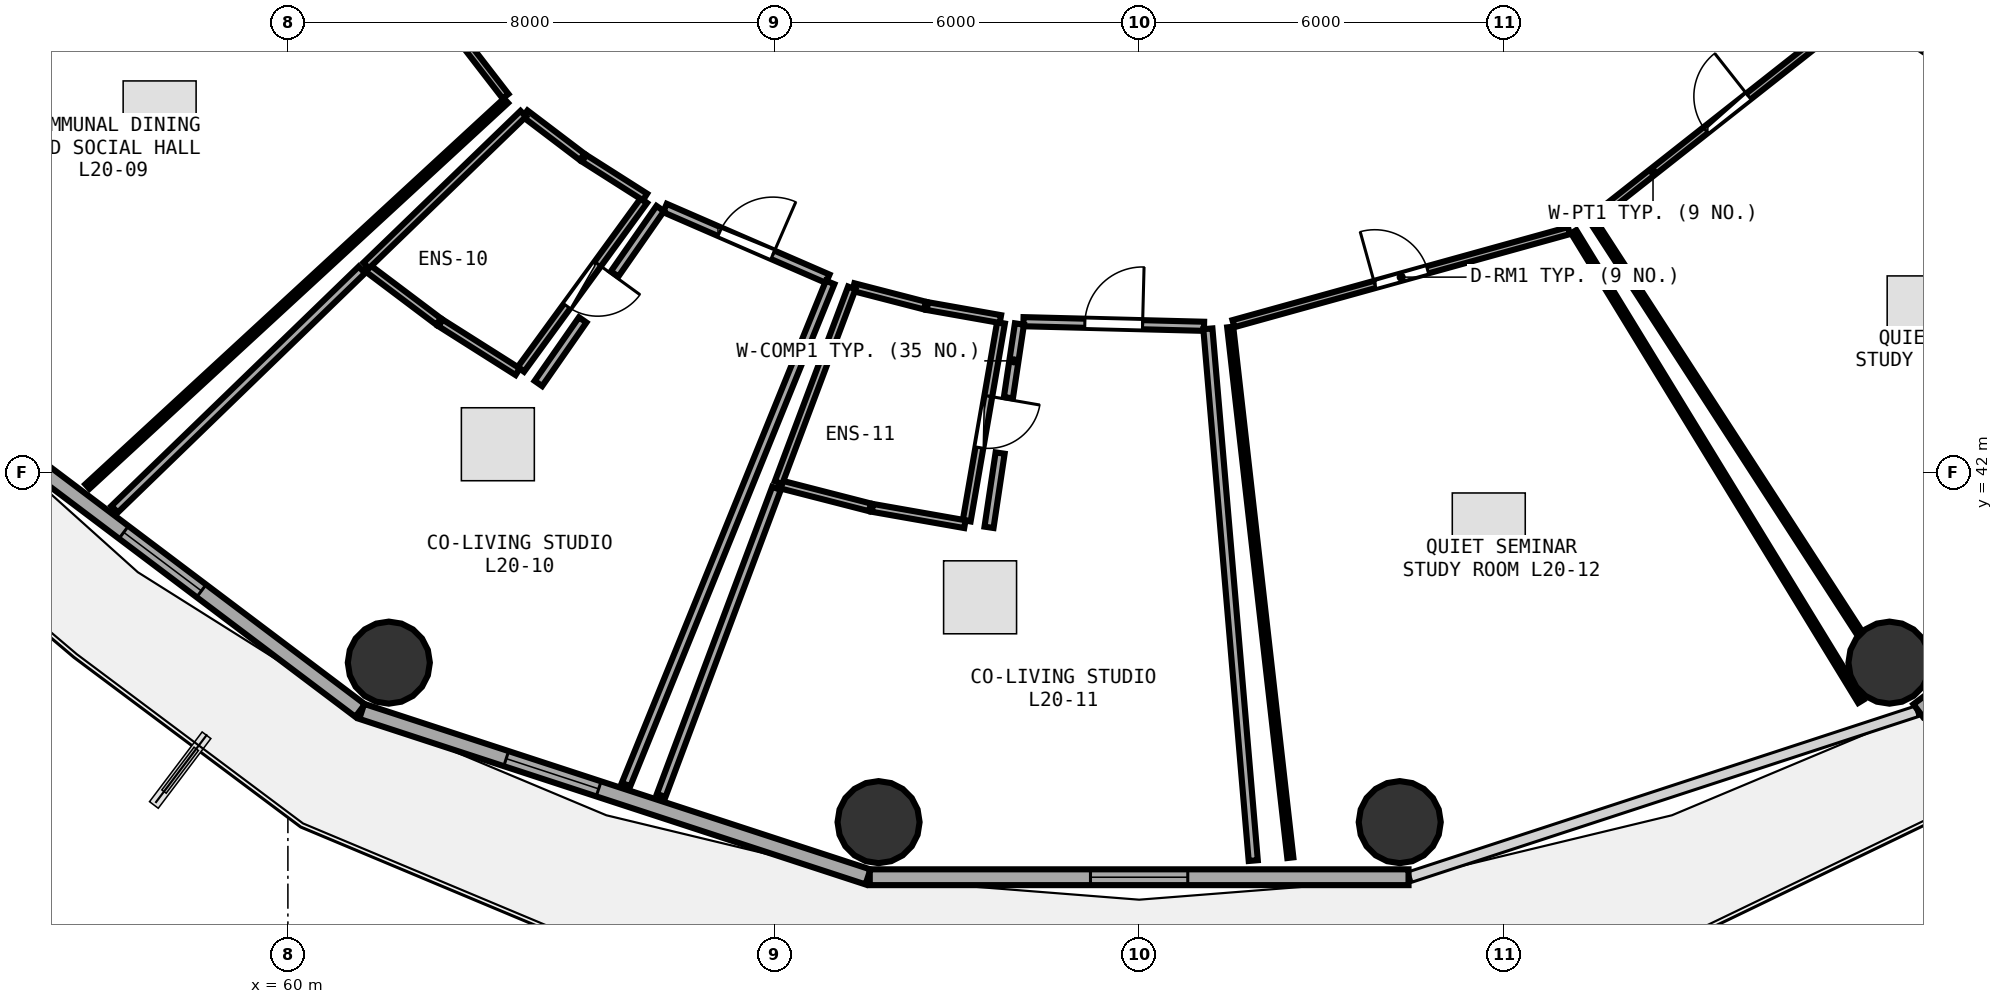
"""IFC4 building model, lengths in metres.
Left out: names, types, materials, properties, quantities, classifications, styles, units other than length and angle.
Written with IfcOpenShell. Run it as: python <this file> out.ifc"""

import sys

from ifc_helpers import new_model, si_unit, direction, frame, frame_2d, origin, origin_2d, place, context, subcontext, project, spatial, rectangle, circle, extrude, element, fill, save


model = new_model("IFC4")
c1 = context("Model", 3, precision=1e-05, world=origin(), true_north=direction((0.0, 1.0)))
c2 = subcontext(c1, "Body", "Model", "MODEL_VIEW")
j1 = project(units=[si_unit("LENGTHUNIT", "METRE"), si_unit("PLANEANGLEUNIT", "RADIAN")], contexts=[c1])
p1 = place(None, origin())
s1 = spatial("IfcSite", under=j1, at=p1, CompositionType="ELEMENT")
p2 = place(p1, origin())
s2 = spatial("IfcBuilding", under=s1, at=p2, CompositionType="ELEMENT")
p3 = place(p2, frame((0.0, 0.0, 80.1)))
s3 = spatial("IfcBuildingStorey", under=s2, at=p3, CompositionType="ELEMENT", Elevation=80.1)
for number, where, z_axis, x_axis in (
    (1, (61.66, 38.878, 0.0), (0.0, 0.0, 1.0), (1.0, 0.0, 0.0)),
    (2, (69.714, 36.255, 0.0), (0.0, 0.0, 1.0), (1.0, 0.0, 0.0)),
    (3, (78.286, 36.255, 0.0), (0.0, 0.0, 1.0), (1.0, 0.0, 0.0)),
    (4, (86.34, 38.878, 0.0), (0.0, 0.0, 1.0), (1.0, 0.0, 0.0)),
):
    element("IfcColumn", number, at=place(p3, frame(where, z_axis=z_axis, x_axis=x_axis)), inside=s3, PredefinedType="COLUMN", context=c2, shape_type="SweptSolid", body=[
        extrude(circle(Radius=0.675, at=origin_2d()), origin(), (0.0, 0.0, 1.0), 3.75),
    ])
p4 = place(p3, frame((54.401, 43.207, 0.0), z_axis=(0.0, 0.0, 1.0), x_axis=(0.798501507879, -0.601992808857, 0.0)))
e5 = element("IfcWall", 5, at=p4, inside=s3, PredefinedType="SOLIDWALL", context=c2, shape_type="SweptSolid", body=[
    extrude(rectangle(XDim=8.499, YDim=0.26, at=frame_2d((4.25, 0.0))), origin(), (0.0, 0.0, 1.0), 3.475),
])
p5 = place(p4, frame((3.63, 0.0, 0.85)))
e6 = element("IfcOpeningElement", 6, at=p5, cuts=e5, PredefinedType="OPENING", context=c2, shape_type="SweptSolid", body=[
    extrude(rectangle(XDim=1.6, YDim=1.45, at=frame_2d((0.8, 0.725))), frame((0.0, 0.14, 0.0), z_axis=(0.0, -1.0, 0.0), x_axis=(1.0, 0.0, 0.0)), (0.0, 0.0, 1.0), 0.28),
])
p6 = place(p3, frame((61.214, 38.077, 0.0), z_axis=(0.0, 0.0, 1.0), x_axis=(0.950471101963, -0.310812941064, 0.0)))
e7 = element("IfcWall", 7, at=p6, inside=s3, PredefinedType="SOLIDWALL", context=c2, shape_type="SweptSolid", body=[
    extrude(rectangle(XDim=8.76, YDim=0.26, at=frame_2d((4.38, 0.0))), origin(), (0.0, 0.0, 1.0), 3.475),
])
p7 = place(p6, frame((2.5, 0.0, 0.85)))
e8 = element("IfcOpeningElement", 8, at=p7, cuts=e7, PredefinedType="OPENING", context=c2, shape_type="SweptSolid", body=[
    extrude(rectangle(XDim=1.6, YDim=1.45, at=frame_2d((0.8, 0.725))), frame((0.0, 0.14, 0.0), z_axis=(0.0, -1.0, 0.0), x_axis=(1.0, 0.0, 0.0)), (0.0, 0.0, 1.0), 0.28),
])
p8 = place(p3, frame((69.57, 35.349, 0.0), z_axis=(0.0, 0.0, 1.0), x_axis=(1.0, 0.0, 0.0)))
e9 = element("IfcWall", 9, at=p8, inside=s3, PredefinedType="SOLIDWALL", context=c2, shape_type="SweptSolid", body=[
    extrude(rectangle(XDim=8.861, YDim=0.26, at=frame_2d((4.43, 0.0))), origin(), (0.0, 0.0, 1.0), 3.475),
])
p9 = place(p8, frame((3.63, 0.0, 0.85)))
e10 = element("IfcOpeningElement", 10, at=p9, cuts=e9, PredefinedType="OPENING", context=c2, shape_type="SweptSolid", body=[
    extrude(rectangle(XDim=1.6, YDim=1.45, at=frame_2d((0.8, 0.725))), frame((0.0, 0.14, 0.0), z_axis=(0.0, -1.0, 0.0), x_axis=(1.0, 0.0, 0.0)), (0.0, 0.0, 1.0), 0.28),
])
p10 = place(p3, frame((86.812, 38.09, 0.0), z_axis=(0.0, 0.0, 1.0), x_axis=(0.798501507879, 0.601992808857, 0.0)))
e11 = element("IfcWall", 11, at=p10, inside=s3, PredefinedType="SOLIDWALL", context=c2, shape_type="SweptSolid", body=[
    extrude(rectangle(XDim=8.499, YDim=0.26, at=frame_2d((4.25, 0.0))), origin(), (0.0, 0.0, 1.0), 3.475),
])
p11 = place(p10, frame((3.45, 0.0, 0.85)))
e12 = element("IfcOpeningElement", 12, at=p11, cuts=e11, PredefinedType="OPENING", context=c2, shape_type="SweptSolid", body=[
    extrude(rectangle(XDim=1.6, YDim=1.45, at=frame_2d((0.8, 0.725))), frame((0.0, 0.14, 0.0), z_axis=(0.0, -1.0, 0.0), x_axis=(1.0, 0.0, 0.0)), (0.0, 0.0, 1.0), 0.28),
])
p12 = place(p3, frame((60.275, 52.473, 0.0), z_axis=(0.0, 0.0, 1.0), x_axis=(0.611167326409, -0.791501420801, 0.0)))
e13 = element("IfcWall", 13, at=p12, inside=s3, PredefinedType="PARTITIONING", context=c2, shape_type="SweptSolid", body=[
    extrude(rectangle(XDim=5.407, YDim=0.12, at=frame_2d((2.704, 0.0))), origin(), (0.0, 0.0, 1.0), 2.925),
])
p13 = place(p12, frame((2.254, 0.0, 0.0)))
e14 = element("IfcOpeningElement", 14, at=p13, cuts=e13, PredefinedType="OPENING", context=c2, shape_type="SweptSolid", body=[
    extrude(rectangle(XDim=0.9, YDim=2.08, at=frame_2d((0.45, 1.04))), frame((0.0, 0.07, 0.0), z_axis=(0.0, -1.0, 0.0), x_axis=(1.0, 0.0, 0.0)), (0.0, 0.0, 1.0), 0.14),
])
p14 = place(p3, frame((65.855, 46.477, 0.0), z_axis=(0.0, 0.0, 1.0), x_axis=(-0.589016516568, -0.808120995402, 0.0)))
e15 = element("IfcWall", 15, at=p14, inside=s3, PredefinedType="PLUMBINGWALL", context=c2, shape_type="SweptSolid", body=[
    extrude(rectangle(XDim=3.435, YDim=0.13, at=frame_2d((1.718, 0.0))), origin(), (0.0, 0.0, 1.0), 3.175),
])
p15 = place(p14, frame((1.288, 0.0, 0.0)))
e16 = element("IfcOpeningElement", 16, at=p15, cuts=e15, PredefinedType="OPENING", context=c2, shape_type="SweptSolid", body=[
    extrude(rectangle(XDim=0.86, YDim=2.05, at=frame_2d((0.43, 1.025))), frame((0.0, 0.075, 0.0), z_axis=(0.0, -1.0, 0.0), x_axis=(1.0, 0.0, 0.0)), (0.0, 0.0, 1.0), 0.15),
])
p16 = place(p3, frame((66.201, 46.355, 0.0), z_axis=(0.0, 0.0, 1.0), x_axis=(0.917173751057, -0.398487528503, 0.0)))
e17 = element("IfcWall", 17, at=p16, inside=s3, PredefinedType="PARTITIONING", context=c2, shape_type="SweptSolid", body=[
    extrude(rectangle(XDim=2.919, YDim=0.15, at=frame_2d((1.459, 0.0))), origin(), (0.0, 0.0, 1.0), 2.925),
])
p17 = place(p16, frame((0.984, 0.0, 0.0)))
e18 = element("IfcOpeningElement", 18, at=p17, cuts=e17, PredefinedType="OPENING", context=c2, shape_type="SweptSolid", body=[
    extrude(rectangle(XDim=0.95, YDim=2.08, at=frame_2d((0.475, 1.04))), frame((0.0, 0.085, 0.0), z_axis=(0.0, -1.0, 0.0), x_axis=(1.0, 0.0, 0.0)), (0.0, 0.0, 1.0), 0.17),
])
p18 = place(p3, frame((71.728, 44.466, 0.0), z_axis=(0.0, 0.0, 1.0), x_axis=(-0.170592496202, -0.985341666753, 0.0)))
e19 = element("IfcWall", 19, at=p18, inside=s3, PredefinedType="PLUMBINGWALL", context=c2, shape_type="SweptSolid", body=[
    extrude(rectangle(XDim=3.303, YDim=0.13, at=frame_2d((1.651, 0.0))), origin(), (0.0, 0.0, 1.0), 3.175),
])
p19 = place(p18, frame((1.222, 0.0, 0.0)))
e20 = element("IfcOpeningElement", 20, at=p19, cuts=e19, PredefinedType="OPENING", context=c2, shape_type="SweptSolid", body=[
    extrude(rectangle(XDim=0.86, YDim=2.05, at=frame_2d((0.43, 1.025))), frame((0.0, 0.075, 0.0), z_axis=(0.0, -1.0, 0.0), x_axis=(1.0, 0.0, 0.0)), (0.0, 0.0, 1.0), 0.15),
])
p20 = place(p3, frame((72.097, 44.486, 0.0), z_axis=(0.0, 0.0, 1.0), x_axis=(0.999671268913, -0.025638917871, 0.0)))
e21 = element("IfcWall", 21, at=p20, inside=s3, PredefinedType="PARTITIONING", context=c2, shape_type="SweptSolid", body=[
    extrude(rectangle(XDim=2.971, YDim=0.15, at=frame_2d((1.485, 0.0))), origin(), (0.0, 0.0, 1.0), 3.48),
])
p21 = place(p20, frame((1.01, 0.0, 0.0)))
e22 = element("IfcOpeningElement", 22, at=p21, cuts=e21, PredefinedType="OPENING", context=c2, shape_type="SweptSolid", body=[
    extrude(rectangle(XDim=0.95, YDim=2.08, at=frame_2d((0.475, 1.04))), frame((0.0, 0.085, 0.0), z_axis=(0.0, -1.0, 0.0), x_axis=(1.0, 0.0, 0.0)), (0.0, 0.0, 1.0), 0.17),
])
p22 = place(p3, frame((75.551, 44.453, 0.0), z_axis=(0.0, 0.0, 1.0), x_axis=(0.963633279283, 0.267228185374, 0.0)))
e23 = element("IfcWall", 23, at=p22, inside=s3, PredefinedType="PARTITIONING", context=c2, shape_type="SweptSolid", body=[
    extrude(rectangle(XDim=5.726, YDim=0.12, at=frame_2d((2.863, 0.0))), origin(), (0.0, 0.0, 1.0), 2.925),
])
p23 = place(p22, frame((2.413, 0.0, 0.0)))
e24 = element("IfcOpeningElement", 24, at=p23, cuts=e23, PredefinedType="OPENING", context=c2, shape_type="SweptSolid", body=[
    extrude(rectangle(XDim=0.9, YDim=2.08, at=frame_2d((0.45, 1.04))), frame((0.0, 0.07, 0.0), z_axis=(0.0, -1.0, 0.0), x_axis=(1.0, 0.0, 0.0)), (0.0, 0.0, 1.0), 0.14),
])
p24 = place(p3, frame((81.494, 46.198, 0.0), z_axis=(0.0, 0.0, 1.0), x_axis=(0.785315722545, 0.619095482074, 0.0)))
e25 = element("IfcWall", 25, at=p24, inside=s3, PredefinedType="PARTITIONING", context=c2, shape_type="SweptSolid", body=[
    extrude(rectangle(XDim=5.54, YDim=0.12, at=frame_2d((2.77, 0.0))), origin(), (0.0, 0.0, 1.0), 2.925),
])
p25 = place(p24, frame((2.32, 0.0, 0.0)))
e26 = element("IfcOpeningElement", 26, at=p25, cuts=e25, PredefinedType="OPENING", context=c2, shape_type="SweptSolid", body=[
    extrude(rectangle(XDim=0.9, YDim=2.08, at=frame_2d((0.45, 1.04))), frame((0.0, 0.07, 0.0), z_axis=(0.0, -1.0, 0.0), x_axis=(1.0, 0.0, 0.0)), (0.0, 0.0, 1.0), 0.14),
])
p26 = place(p3, frame((63.587, 48.119, 0.0), z_axis=(0.0, 0.0, 1.0), x_axis=(-0.735387084409, -0.677647279995, 0.0)))
e27 = element("IfcWall", 27, at=p26, inside=s3, PredefinedType="PARTITIONING", context=c2, shape_type="SweptSolid", body=[
    extrude(rectangle(XDim=9.361, YDim=0.1, at=frame_2d((4.681, 0.0))), origin(), (0.0, 0.0, 1.0), 2.975),
])
p27 = place(p3, frame((63.901, 47.907, 0.0), z_axis=(0.0, 0.0, 1.0), x_axis=(0.796629313308, -0.604468144056, 0.0)))
e28 = element("IfcWall", 28, at=p27, inside=s3, PredefinedType="PLUMBINGWALL", context=c2, shape_type="SweptSolid", body=[
    extrude(rectangle(XDim=1.178, YDim=0.13, at=frame_2d((0.589, 0.0))), origin(), (0.0, 0.0, 1.0), 2.925),
])
p28 = place(p3, frame((64.872, 47.172, 0.0), z_axis=(0.0, 0.0, 1.0), x_axis=(0.843822426876, -0.536622504095, 0.0)))
e29 = element("IfcWall", 29, at=p28, inside=s3, PredefinedType="PLUMBINGWALL", context=c2, shape_type="SweptSolid", body=[
    extrude(rectangle(XDim=1.187, YDim=0.13, at=frame_2d((0.593, 0.0))), origin(), (0.0, 0.0, 1.0), 3.48),
])
p29 = place(p3, frame((63.779, 43.663, 0.0), z_axis=(0.0, 0.0, 1.0), x_axis=(-0.844931806669, 0.53487404319, 0.0)))
e30 = element("IfcWall", 30, at=p29, inside=s3, PredefinedType="PLUMBINGWALL", context=c2, shape_type="SweptSolid", body=[
    extrude(rectangle(XDim=1.501, YDim=0.13, at=frame_2d((0.75, 0.0))), origin(), (0.0, 0.0, 1.0), 2.925),
])
p30 = place(p3, frame((62.478, 44.488, 0.0), z_axis=(0.0, 0.0, 1.0), x_axis=(-0.798935684124, 0.601416471868, 0.0)))
e31 = element("IfcWall", 31, at=p30, inside=s3, PredefinedType="PLUMBINGWALL", context=c2, shape_type="SweptSolid", body=[
    extrude(rectangle(XDim=1.488, YDim=0.13, at=frame_2d((0.744, 0.0))), origin(), (0.0, 0.0, 1.0), 3.175),
])
p31 = place(p3, frame((61.287, 45.409, 0.0), z_axis=(0.0, 0.0, 1.0), x_axis=(0.719134400332, 0.694871005481, 0.0)))
e32 = element("IfcWall", 32, at=p31, inside=s3, PredefinedType="PLUMBINGWALL", context=c2, shape_type="SweptSolid", body=[
    extrude(rectangle(XDim=3.592, YDim=0.13, at=frame_2d((1.796, 0.0))), origin(), (0.0, 0.0, 1.0), 3.175),
])
p32 = place(p3, frame((68.918, 45.131, 0.0), z_axis=(0.0, 0.0, 1.0), x_axis=(-0.376588613193, -0.926380600193, 0.0)))
e33 = element("IfcWall", 33, at=p32, inside=s3, PredefinedType="PARTITIONING", context=c2, shape_type="SweptSolid", body=[
    extrude(rectangle(XDim=8.914, YDim=0.15, at=frame_2d((4.457, 0.0))), origin(), (0.0, 0.0, 1.0), 2.925),
])
p33 = place(p3, frame((57.15, 41.401, 0.0), z_axis=(0.0, 0.0, 1.0), x_axis=(0.718527749954, 0.695498290829, 0.0)))
e34 = element("IfcWall", 34, at=p33, inside=s3, PredefinedType="PARTITIONING", context=c2, shape_type="SweptSolid", body=[
    extrude(rectangle(XDim=5.661, YDim=0.15, at=frame_2d((2.831, 0.0))), origin(), (0.0, 0.0, 1.0), 2.975),
])
p34 = place(p3, frame((64.12, 43.469, 0.0), z_axis=(0.0, 0.0, 1.0), x_axis=(0.571339432424, 0.820713867897, 0.0)))
e35 = element("IfcWall", 35, at=p34, inside=s3, PredefinedType="PARTITIONING", context=c2, shape_type="SweptSolid", body=[
    extrude(rectangle(XDim=1.275, YDim=0.15, at=frame_2d((0.637, 0.0))), origin(), (0.0, 0.0, 1.0), 3.175),
])
p35 = place(p3, frame((65.374, 45.27, 0.0), z_axis=(0.0, 0.0, 1.0), x_axis=(0.57134818524, 0.82070777456, 0.0)))
e36 = element("IfcWall", 36, at=p35, inside=s3, PredefinedType="PARTITIONING", context=c2, shape_type="SweptSolid", body=[
    extrude(rectangle(XDim=1.311, YDim=0.15, at=frame_2d((0.656, 0.0))), origin(), (0.0, 0.0, 1.0), 3.235),
])
p36 = place(p3, frame((69.3, 45.054, 0.0), z_axis=(0.0, 0.0, 1.0), x_axis=(0.968247539973, -0.249993402585, 0.0)))
e37 = element("IfcWall", 37, at=p36, inside=s3, PredefinedType="PLUMBINGWALL", context=c2, shape_type="SweptSolid", body=[
    extrude(rectangle(XDim=1.216, YDim=0.13, at=frame_2d((0.608, 0.0))), origin(), (0.0, 0.0, 1.0), 3.48),
])
p37 = place(p3, frame((70.517, 44.741, 0.0), z_axis=(0.0, 0.0, 1.0), x_axis=(0.98466652622, -0.174447218786, 0.0)))
e38 = element("IfcWall", 38, at=p37, inside=s3, PredefinedType="PLUMBINGWALL", context=c2, shape_type="SweptSolid", body=[
    extrude(rectangle(XDim=1.22, YDim=0.13, at=frame_2d((0.61, 0.0))), origin(), (0.0, 0.0, 1.0), 3.48),
])
p38 = place(p3, frame((71.134, 41.156, 0.0), z_axis=(0.0, 0.0, 1.0), x_axis=(-0.984831248295, 0.173514876545, 0.0)))
e39 = element("IfcWall", 39, at=p38, inside=s3, PredefinedType="PLUMBINGWALL", context=c2, shape_type="SweptSolid", body=[
    extrude(rectangle(XDim=1.545, YDim=0.13, at=frame_2d((0.772, 0.0))), origin(), (0.0, 0.0, 1.0), 3.48),
])
p39 = place(p3, frame((69.573, 41.432, 0.0), z_axis=(0.0, 0.0, 1.0), x_axis=(-0.968594416315, 0.248646046989, 0.0)))
e40 = element("IfcWall", 40, at=p39, inside=s3, PredefinedType="PLUMBINGWALL", context=c2, shape_type="SweptSolid", body=[
    extrude(rectangle(XDim=1.541, YDim=0.13, at=frame_2d((0.77, 0.0))), origin(), (0.0, 0.0, 1.0), 2.925),
])
p40 = place(p3, frame((68.069, 41.839, 0.0), z_axis=(0.0, 0.0, 1.0), x_axis=(0.352202531552, 0.935923809275, 0.0)))
e41 = element("IfcWall", 41, at=p40, inside=s3, PredefinedType="PLUMBINGWALL", context=c2, shape_type="SweptSolid", body=[
    extrude(rectangle(XDim=3.421, YDim=0.13, at=frame_2d((1.71, 0.0))), origin(), (0.0, 0.0, 1.0), 2.925),
])
p41 = place(p3, frame((75.13, 44.368, 0.0), z_axis=(0.0, 0.0, 1.0), x_axis=(0.085031915446, -0.996378228062, 0.0)))
e42 = element("IfcWall", 42, at=p41, inside=s3, PredefinedType="PARTITIONING", context=c2, shape_type="SweptSolid", body=[
    extrude(rectangle(XDim=8.777, YDim=0.15, at=frame_2d((4.389, 0.0))), origin(), (0.0, 0.0, 1.0), 2.975),
])
p42 = place(p3, frame((66.139, 36.694, 0.0), z_axis=(0.0, 0.0, 1.0), x_axis=(0.351589591196, 0.936154239088, 0.0)))
e43 = element("IfcWall", 43, at=p42, inside=s3, PredefinedType="PARTITIONING", context=c2, shape_type="SweptSolid", body=[
    extrude(rectangle(XDim=5.395, YDim=0.15, at=frame_2d((2.697, 0.0))), origin(), (0.0, 0.0, 1.0), 2.975),
])
p43 = place(p3, frame((71.531, 41.104, 0.0), z_axis=(0.0, 0.0, 1.0), x_axis=(0.147866770411, 0.989007289259, 0.0)))
e44 = element("IfcWall", 44, at=p43, inside=s3, PredefinedType="PARTITIONING", context=c2, shape_type="SweptSolid", body=[
    extrude(rectangle(XDim=1.235, YDim=0.15, at=frame_2d((0.618, 0.0))), origin(), (0.0, 0.0, 1.0), 3.175),
])
p44 = place(p3, frame((71.85, 43.235, 0.0), z_axis=(0.0, 0.0, 1.0), x_axis=(0.14797037904, 0.988991793154, 0.0)))
e45 = element("IfcWall", 45, at=p44, inside=s3, PredefinedType="PARTITIONING", context=c2, shape_type="SweptSolid", body=[
    extrude(rectangle(XDim=1.226, YDim=0.15, at=frame_2d((0.613, 0.0))), origin(), (0.0, 0.0, 1.0), 3.48),
])
p45 = place(p3, frame((81.147, 45.965, 0.0), z_axis=(0.0, 0.0, 1.0), x_axis=(0.521624536189, -0.853175153908, 0.0)))
e46 = element("IfcWall", 46, at=p45, inside=s3, PredefinedType="PARTITIONING", context=c2, shape_type="SweptSolid", body=[
    extrude(rectangle(XDim=9.053, YDim=0.1, at=frame_2d((4.526, 0.0))), origin(), (0.0, 0.0, 1.0), 2.975),
])
p46 = place(p3, frame((76.487, 35.671, 0.0), z_axis=(0.0, 0.0, 1.0), x_axis=(-0.112612784854, 0.993638948858, 0.0)))
e47 = element("IfcWall", 47, at=p46, inside=s3, PredefinedType="PARTITIONING", context=c2, shape_type="SweptSolid", body=[
    extrude(rectangle(XDim=8.782, YDim=0.1, at=frame_2d((4.391, 0.0))), origin(), (0.0, 0.0, 1.0), 2.975),
])
p47 = place(p3, frame((85.925, 49.643, 0.0), z_axis=(0.0, 0.0, 1.0), x_axis=(0.826688408753, -0.562659999319, 0.0)))
e48 = element("IfcWall", 48, at=p47, inside=s3, PredefinedType="PARTITIONING", context=c2, shape_type="SweptSolid", body=[
    extrude(rectangle(XDim=9.539, YDim=0.1, at=frame_2d((4.77, 0.0))), origin(), (0.0, 0.0, 1.0), 2.975),
])
p48 = place(p3, frame((85.844, 39.372, 0.0), z_axis=(0.0, 0.0, 1.0), x_axis=(-0.543590830013, 0.839350349691, 0.0)))
e49 = element("IfcWall", 49, at=p48, inside=s3, PredefinedType="PARTITIONING", context=c2, shape_type="SweptSolid", body=[
    extrude(rectangle(XDim=8.048, YDim=0.1, at=frame_2d((4.024, 0.0))), origin(), (0.0, 0.0, 1.0), 3.175),
])
p49 = place(p3, frame((87.552, 48.874, 0.0), z_axis=(0.0, 0.0, 1.0), x_axis=(-0.805902241708, 0.592048627065, 0.0)))
e50 = element("IfcWall", 50, at=p49, inside=s3, PredefinedType="PARTITIONING", context=c2, shape_type="SweptSolid", body=[
    extrude(rectangle(XDim=1.746, YDim=0.1, at=frame_2d((0.873, 0.0))), origin(), (0.0, 0.0, 1.0), 3.235),
])
p50 = place(p5, origin())
e51 = element("IfcWindow", 51, at=p50, inside=s3, PartitioningType="SINGLE_PANEL", PredefinedType="WINDOW", context=c2, shape_type="SweptSolid", body=[
    extrude(rectangle(XDim=1.6, YDim=1.45, at=frame_2d((0.8, 0.725))), frame((0.0, 0.03, 0.0), z_axis=(0.0, -1.0, 0.0), x_axis=(1.0, 0.0, 0.0)), (0.0, 0.0, 1.0), 0.06),
])
fill(e6, e51)
p51 = place(p7, origin())
e52 = element("IfcWindow", 52, at=p51, inside=s3, PartitioningType="SINGLE_PANEL", PredefinedType="WINDOW", context=c2, shape_type="SweptSolid", body=[
    extrude(rectangle(XDim=1.6, YDim=1.45, at=frame_2d((0.8, 0.725))), frame((0.0, 0.03, 0.0), z_axis=(0.0, -1.0, 0.0), x_axis=(1.0, 0.0, 0.0)), (0.0, 0.0, 1.0), 0.06),
])
fill(e8, e52)
p52 = place(p9, origin())
e53 = element("IfcWindow", 53, at=p52, inside=s3, PartitioningType="SINGLE_PANEL", PredefinedType="WINDOW", context=c2, shape_type="SweptSolid", body=[
    extrude(rectangle(XDim=1.6, YDim=1.45, at=frame_2d((0.8, 0.725))), frame((0.0, 0.03, 0.0), z_axis=(0.0, -1.0, 0.0), x_axis=(1.0, 0.0, 0.0)), (0.0, 0.0, 1.0), 0.06),
])
fill(e10, e53)
p53 = place(p15, origin())
e54 = element("IfcDoor", 54, at=p53, inside=s3, OperationType="SINGLE_SWING_LEFT", PredefinedType="DOOR", context=c2, shape_type="SweptSolid", body=[
    extrude(rectangle(XDim=0.86, YDim=2.05, at=frame_2d((0.43, 1.025))), frame((0.0, 0.025, 0.0), z_axis=(0.0, -1.0, 0.0), x_axis=(1.0, 0.0, 0.0)), (0.0, 0.0, 1.0), 0.05),
])
fill(e16, e54)
p54 = place(p17, origin())
e55 = element("IfcDoor", 55, at=p54, inside=s3, OperationType="SINGLE_SWING_RIGHT", PredefinedType="DOOR", context=c2, shape_type="SweptSolid", body=[
    extrude(rectangle(XDim=0.95, YDim=2.08, at=frame_2d((0.475, 1.04))), frame((0.0, 0.025, 0.0), z_axis=(0.0, -1.0, 0.0), x_axis=(1.0, 0.0, 0.0)), (0.0, 0.0, 1.0), 0.05),
])
fill(e18, e55)
p55 = place(p19, origin())
e56 = element("IfcDoor", 56, at=p55, inside=s3, OperationType="SINGLE_SWING_LEFT", PredefinedType="DOOR", context=c2, shape_type="SweptSolid", body=[
    extrude(rectangle(XDim=0.86, YDim=2.05, at=frame_2d((0.43, 1.025))), frame((0.0, 0.025, 0.0), z_axis=(0.0, -1.0, 0.0), x_axis=(1.0, 0.0, 0.0)), (0.0, 0.0, 1.0), 0.05),
])
fill(e20, e56)
p56 = place(p21, origin())
e57 = element("IfcDoor", 57, at=p56, inside=s3, OperationType="SINGLE_SWING_RIGHT", PredefinedType="DOOR", context=c2, shape_type="SweptSolid", body=[
    extrude(rectangle(XDim=0.95, YDim=2.08, at=frame_2d((0.475, 1.04))), frame((0.0, 0.025, 0.0), z_axis=(0.0, -1.0, 0.0), x_axis=(1.0, 0.0, 0.0)), (0.0, 0.0, 1.0), 0.05),
])
fill(e22, e57)
p57 = place(p23, origin())
e58 = element("IfcDoor", 58, at=p57, inside=s3, OperationType="SINGLE_SWING_LEFT", PredefinedType="DOOR", context=c2, shape_type="SweptSolid", body=[
    extrude(rectangle(XDim=0.9, YDim=2.08, at=frame_2d((0.45, 1.04))), frame((0.0, 0.025, 0.0), z_axis=(0.0, -1.0, 0.0), x_axis=(1.0, 0.0, 0.0)), (0.0, 0.0, 1.0), 0.05),
])
fill(e24, e58)
p58 = place(p25, origin())
e59 = element("IfcDoor", 59, at=p58, inside=s3, OperationType="SINGLE_SWING_RIGHT", PredefinedType="DOOR", context=c2, shape_type="SweptSolid", body=[
    extrude(rectangle(XDim=0.9, YDim=2.08, at=frame_2d((0.45, 1.04))), frame((0.0, 0.025, 0.0), z_axis=(0.0, -1.0, 0.0), x_axis=(1.0, 0.0, 0.0)), (0.0, 0.0, 1.0), 0.05),
])
fill(e26, e59)
save(model, sys.argv[1])
